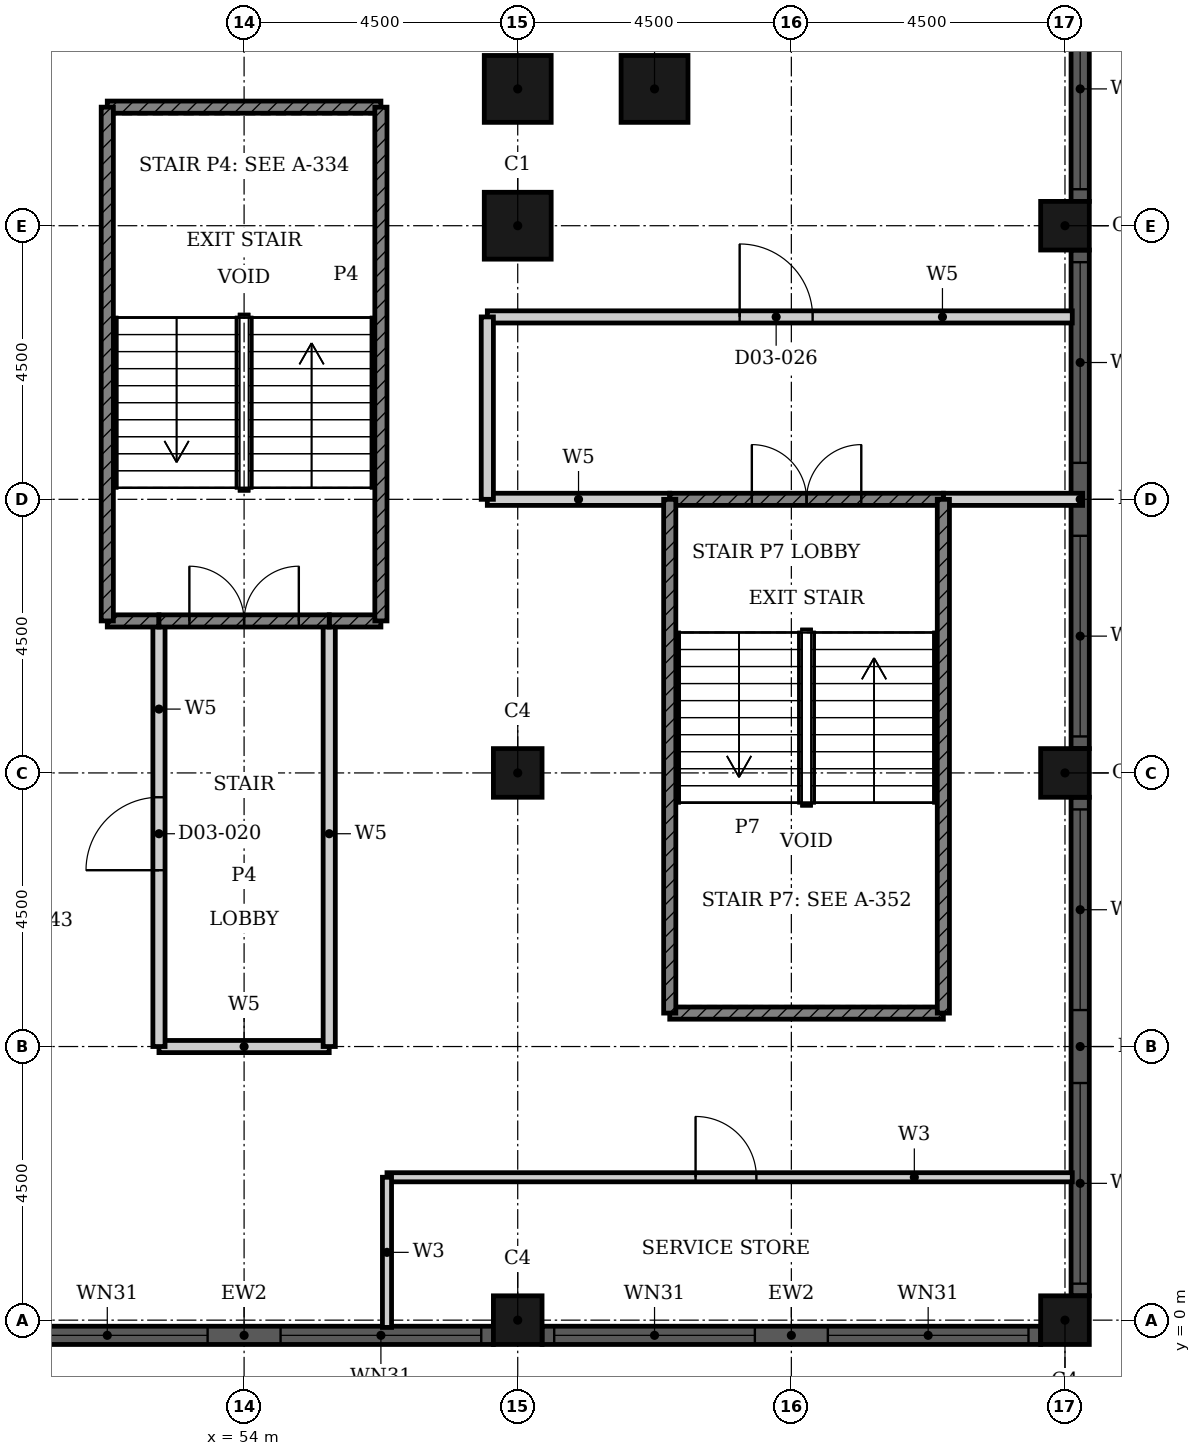
"""IFC4 building model, lengths in metres.
Left out: names, types, materials, properties, quantities, classifications, styles, units other than length and angle.
Written with IfcOpenShell. Run it as: python <this file> out.ifc"""

import sys

from ifc_helpers import new_model, si_unit, direction, frame, frame_2d, origin, origin_2d, place, context, subcontext, project, spatial, rectangle, hollow_rectangle, extrude, element, fill, save


model = new_model("IFC4")
c1 = context("Model", 3, precision=1e-05, world=origin(), true_north=direction((0.0, 1.0)))
c2 = subcontext(c1, "Body", "Model", "MODEL_VIEW")
j1 = project(units=[si_unit("LENGTHUNIT", "METRE"), si_unit("PLANEANGLEUNIT", "RADIAN")], contexts=[c1])
p1 = place(None, origin())
s1 = spatial("IfcSite", under=j1, at=p1, CompositionType="ELEMENT")
p2 = place(p1, origin())
s2 = spatial("IfcBuilding", under=s1, at=p2, CompositionType="ELEMENT")
p3 = place(p2, frame((0.0, 0.0, 17.4)))
s3 = spatial("IfcBuildingStorey", under=s2, at=p3, CompositionType="ELEMENT", Elevation=17.4)
for number, where, z_axis, x_axis in (
    (1, (58.5, 18.0, 0.0), (0.0, 0.0, 1.0), (1.0, 0.0, 0.0)),
    (2, (58.5, 20.25, 0.0), (0.0, 0.0, 1.0), (1.0, 0.0, 0.0)),
    (3, (60.75, 20.25, 0.0), (0.0, 0.0, 1.0), (1.0, 0.0, 0.0)),
):
    element("IfcColumn", number, at=place(p3, frame(where, z_axis=z_axis, x_axis=x_axis)), inside=s3, PredefinedType="COLUMN", context=c2, shape_type="SweptSolid", body=[
        extrude(hollow_rectangle(XDim=1.1, YDim=1.1, WallThickness=0.036, at=origin_2d()), origin(), (0.0, 0.0, 1.0), 6.6),
    ])
for number, where, z_axis, x_axis in (
    (4, (58.5, 0.0, 0.0), (0.0, 0.0, 1.0), (1.0, 0.0, 0.0)),
    (5, (67.5, 0.0, 0.0), (0.0, 0.0, 1.0), (1.0, 0.0, 0.0)),
    (6, (67.5, 9.0, 0.0), (0.0, 0.0, 1.0), (1.0, 0.0, 0.0)),
    (7, (67.5, 18.0, 0.0), (0.0, 0.0, 1.0), (1.0, 0.0, 0.0)),
    (8, (58.5, 9.0, 0.0), (0.0, 0.0, 1.0), (1.0, 0.0, 0.0)),
):
    element("IfcColumn", number, at=place(p3, frame(where, z_axis=z_axis, x_axis=x_axis)), inside=s3, PredefinedType="COLUMN", context=c2, shape_type="SweptSolid", body=[
        extrude(hollow_rectangle(XDim=0.8, YDim=0.8, WallThickness=0.025, at=origin_2d()), origin(), (0.0, 0.0, 1.0), 6.6),
    ])
p4 = place(p3, frame((67.75, 0.4, 0.0), z_axis=(0.0, 0.0, 1.0), x_axis=(0.0, 1.0, 0.0)))
e9 = element("IfcWall", 9, at=p4, inside=s3, PredefinedType="SOLIDWALL", context=c2, shape_type="SweptSolid", body=[
    extrude(rectangle(XDim=8.2, YDim=0.3, at=frame_2d((4.1, 0.0))), origin(), (0.0, 0.0, 1.0), 6.6),
])
p5 = place(p4, frame((0.2, 0.0, 0.9)))
e10 = element("IfcOpeningElement", 10, at=p5, cuts=e9, PredefinedType="OPENING", context=c2, shape_type="SweptSolid", body=[
    extrude(rectangle(XDim=3.3, YDim=3.6, at=frame_2d((1.65, 1.8))), frame((0.0, 0.16, 0.0), z_axis=(0.0, -1.0, 0.0), x_axis=(1.0, 0.0, 0.0)), (0.0, 0.0, 1.0), 0.32),
])
p6 = place(p4, frame((4.7, 0.0, 0.9)))
e11 = element("IfcOpeningElement", 11, at=p6, cuts=e9, PredefinedType="OPENING", context=c2, shape_type="SweptSolid", body=[
    extrude(rectangle(XDim=3.3, YDim=3.6, at=frame_2d((1.65, 1.8))), frame((0.0, 0.16, 0.0), z_axis=(0.0, -1.0, 0.0), x_axis=(1.0, 0.0, 0.0)), (0.0, 0.0, 1.0), 0.32),
])
p7 = place(p3, frame((67.75, 9.4, 0.0), z_axis=(0.0, 0.0, 1.0), x_axis=(0.0, 1.0, 0.0)))
e12 = element("IfcWall", 12, at=p7, inside=s3, PredefinedType="SOLIDWALL", context=c2, shape_type="SweptSolid", body=[
    extrude(rectangle(XDim=8.2, YDim=0.3, at=frame_2d((4.1, 0.0))), origin(), (0.0, 0.0, 1.0), 6.6),
])
p8 = place(p7, frame((0.2, 0.0, 0.9)))
e13 = element("IfcOpeningElement", 13, at=p8, cuts=e12, PredefinedType="OPENING", context=c2, shape_type="SweptSolid", body=[
    extrude(rectangle(XDim=3.3, YDim=3.6, at=frame_2d((1.65, 1.8))), frame((0.0, 0.16, 0.0), z_axis=(0.0, -1.0, 0.0), x_axis=(1.0, 0.0, 0.0)), (0.0, 0.0, 1.0), 0.32),
])
p9 = place(p7, frame((4.7, 0.0, 0.9)))
e14 = element("IfcOpeningElement", 14, at=p9, cuts=e12, PredefinedType="OPENING", context=c2, shape_type="SweptSolid", body=[
    extrude(rectangle(XDim=3.3, YDim=3.6, at=frame_2d((1.65, 1.8))), frame((0.0, 0.16, 0.0), z_axis=(0.0, -1.0, 0.0), x_axis=(1.0, 0.0, 0.0)), (0.0, 0.0, 1.0), 0.32),
])
p10 = place(p3, frame((67.75, 18.4, 0.0), z_axis=(0.0, 0.0, 1.0), x_axis=(0.0, 1.0, 0.0)))
e15 = element("IfcWall", 15, at=p10, inside=s3, PredefinedType="SOLIDWALL", context=c2, shape_type="SweptSolid", body=[
    extrude(rectangle(XDim=8.2, YDim=0.3, at=frame_2d((4.1, 0.0))), origin(), (0.0, 0.0, 1.0), 6.6),
])
p11 = place(p10, frame((0.2, 0.0, 0.9)))
e16 = element("IfcOpeningElement", 16, at=p11, cuts=e15, PredefinedType="OPENING", context=c2, shape_type="SweptSolid", body=[
    extrude(rectangle(XDim=3.3, YDim=3.6, at=frame_2d((1.65, 1.8))), frame((0.0, 0.16, 0.0), z_axis=(0.0, -1.0, 0.0), x_axis=(1.0, 0.0, 0.0)), (0.0, 0.0, 1.0), 0.32),
])
p12 = place(p10, frame((4.7, 0.0, 0.9)))
e17 = element("IfcOpeningElement", 17, at=p12, cuts=e15, PredefinedType="OPENING", context=c2, shape_type="SweptSolid", body=[
    extrude(rectangle(XDim=3.3, YDim=3.6, at=frame_2d((1.65, 1.8))), frame((0.0, 0.16, 0.0), z_axis=(0.0, -1.0, 0.0), x_axis=(1.0, 0.0, 0.0)), (0.0, 0.0, 1.0), 0.32),
])
p13 = place(p3, frame((49.9, -0.25, 0.0), z_axis=(0.0, 0.0, 1.0), x_axis=(1.0, 0.0, 0.0)))
e18 = element("IfcWall", 18, at=p13, inside=s3, PredefinedType="SOLIDWALL", context=c2, shape_type="SweptSolid", body=[
    extrude(rectangle(XDim=8.2, YDim=0.3, at=frame_2d((4.1, 0.0))), origin(), (0.0, 0.0, 1.0), 6.6),
])
p14 = place(p13, frame((0.2, 0.0, 0.9)))
e19 = element("IfcOpeningElement", 19, at=p14, cuts=e18, PredefinedType="OPENING", context=c2, shape_type="SweptSolid", body=[
    extrude(rectangle(XDim=3.3, YDim=3.6, at=frame_2d((1.65, 1.8))), frame((0.0, 0.16, 0.0), z_axis=(0.0, -1.0, 0.0), x_axis=(1.0, 0.0, 0.0)), (0.0, 0.0, 1.0), 0.32),
])
p15 = place(p13, frame((4.7, 0.0, 0.9)))
e20 = element("IfcOpeningElement", 20, at=p15, cuts=e18, PredefinedType="OPENING", context=c2, shape_type="SweptSolid", body=[
    extrude(rectangle(XDim=3.3, YDim=3.6, at=frame_2d((1.65, 1.8))), frame((0.0, 0.16, 0.0), z_axis=(0.0, -1.0, 0.0), x_axis=(1.0, 0.0, 0.0)), (0.0, 0.0, 1.0), 0.32),
])
p16 = place(p3, frame((58.9, -0.25, 0.0), z_axis=(0.0, 0.0, 1.0), x_axis=(1.0, 0.0, 0.0)))
e21 = element("IfcWall", 21, at=p16, inside=s3, PredefinedType="SOLIDWALL", context=c2, shape_type="SweptSolid", body=[
    extrude(rectangle(XDim=8.2, YDim=0.3, at=frame_2d((4.1, 0.0))), origin(), (0.0, 0.0, 1.0), 6.6),
])
p17 = place(p16, frame((0.2, 0.0, 0.9)))
e22 = element("IfcOpeningElement", 22, at=p17, cuts=e21, PredefinedType="OPENING", context=c2, shape_type="SweptSolid", body=[
    extrude(rectangle(XDim=3.3, YDim=3.6, at=frame_2d((1.65, 1.8))), frame((0.0, 0.16, 0.0), z_axis=(0.0, -1.0, 0.0), x_axis=(1.0, 0.0, 0.0)), (0.0, 0.0, 1.0), 0.32),
])
p18 = place(p16, frame((4.7, 0.0, 0.9)))
e23 = element("IfcOpeningElement", 23, at=p18, cuts=e21, PredefinedType="OPENING", context=c2, shape_type="SweptSolid", body=[
    extrude(rectangle(XDim=3.3, YDim=3.6, at=frame_2d((1.65, 1.8))), frame((0.0, 0.16, 0.0), z_axis=(0.0, -1.0, 0.0), x_axis=(1.0, 0.0, 0.0)), (0.0, 0.0, 1.0), 0.32),
])
p19 = place(p3, frame((56.35, 2.35, 0.0), z_axis=(0.0, 0.0, 1.0), x_axis=(1.0, 0.0, 0.0)))
e24 = element("IfcWall", 24, at=p19, inside=s3, PredefinedType="PARTITIONING", context=c2, shape_type="SweptSolid", body=[
    extrude(rectangle(XDim=11.27, YDim=0.15, at=frame_2d((5.635, 0.0))), origin(), (0.0, 0.0, 1.0), 6.25),
])
p20 = place(p19, frame((5.075, 0.0, 0.0)))
e25 = element("IfcOpeningElement", 25, at=p20, cuts=e24, PredefinedType="OPENING", context=c2, shape_type="SweptSolid", body=[
    extrude(rectangle(XDim=1.0, YDim=2.1, at=frame_2d((0.5, 1.05))), frame((0.0, 0.085, 0.0), z_axis=(0.0, -1.0, 0.0), x_axis=(1.0, 0.0, 0.0)), (0.0, 0.0, 1.0), 0.17),
])
p21 = place(p3, frame((56.35, -0.12, 0.0), z_axis=(0.0, 0.0, 1.0), x_axis=(0.0, 1.0, 0.0)))
e26 = element("IfcWall", 26, at=p21, inside=s3, PredefinedType="PARTITIONING", context=c2, shape_type="SweptSolid", body=[
    extrude(rectangle(XDim=2.47, YDim=0.15, at=frame_2d((1.235, 0.0))), origin(), (0.0, 0.0, 1.0), 6.25),
])
p22 = place(p3, frame((58.0, 13.5, 0.0), z_axis=(0.0, 0.0, 1.0), x_axis=(1.0, 0.0, 0.0)))
e27 = element("IfcWall", 27, at=p22, inside=s3, PredefinedType="PARTITIONING", context=c2, shape_type="SweptSolid", body=[
    extrude(rectangle(XDim=3.0, YDim=0.2, at=frame_2d((1.5, 0.0))), origin(), (0.0, 0.0, 1.0), 6.25),
])
p23 = place(p3, frame((65.5, 13.5, 0.0), z_axis=(0.0, 0.0, 1.0), x_axis=(1.0, 0.0, 0.0)))
e28 = element("IfcWall", 28, at=p23, inside=s3, PredefinedType="PARTITIONING", context=c2, shape_type="SweptSolid", body=[
    extrude(rectangle(XDim=2.29, YDim=0.2, at=frame_2d((1.145, 0.0))), origin(), (0.0, 0.0, 1.0), 6.25),
])
p24 = place(p3, frame((58.0, 16.5, 0.0), z_axis=(0.0, 0.0, 1.0), x_axis=(1.0, 0.0, 0.0)))
e29 = element("IfcWall", 29, at=p24, inside=s3, PredefinedType="PARTITIONING", context=c2, shape_type="SweptSolid", body=[
    extrude(rectangle(XDim=9.62, YDim=0.2, at=frame_2d((4.81, 0.0))), origin(), (0.0, 0.0, 1.0), 6.25),
])
p25 = place(p24, frame((4.15, 0.0, 0.0)))
e30 = element("IfcOpeningElement", 30, at=p25, cuts=e29, PredefinedType="OPENING", context=c2, shape_type="SweptSolid", body=[
    extrude(rectangle(XDim=1.2, YDim=2.1, at=frame_2d((0.6, 1.05))), frame((0.0, 0.11, 0.0), z_axis=(0.0, -1.0, 0.0), x_axis=(1.0, 0.0, 0.0)), (0.0, 0.0, 1.0), 0.22),
])
p26 = place(p3, frame((52.6, 4.5, 0.0), z_axis=(0.0, 0.0, 1.0), x_axis=(1.0, 0.0, 0.0)))
e31 = element("IfcWall", 31, at=p26, inside=s3, PredefinedType="PARTITIONING", context=c2, shape_type="SweptSolid", body=[
    extrude(rectangle(XDim=2.8, YDim=0.2, at=frame_2d((1.4, 0.0))), origin(), (0.0, 0.0, 1.0), 6.25),
])
p27 = place(p3, frame((52.6, 4.5, 0.0), z_axis=(0.0, 0.0, 1.0), x_axis=(0.0, 1.0, 0.0)))
e32 = element("IfcWall", 32, at=p27, inside=s3, PredefinedType="PARTITIONING", context=c2, shape_type="SweptSolid", body=[
    extrude(rectangle(XDim=7.0, YDim=0.2, at=frame_2d((3.5, 0.0))), origin(), (0.0, 0.0, 1.0), 6.25),
])
p28 = place(p27, frame((2.9, 0.0, 0.0)))
e33 = element("IfcOpeningElement", 33, at=p28, cuts=e32, PredefinedType="OPENING", context=c2, shape_type="SweptSolid", body=[
    extrude(rectangle(XDim=1.2, YDim=2.1, at=frame_2d((0.6, 1.05))), frame((0.0, 0.11, 0.0), z_axis=(0.0, -1.0, 0.0), x_axis=(1.0, 0.0, 0.0)), (0.0, 0.0, 1.0), 0.22),
])
p29 = place(p3, frame((55.4, 4.5, 0.0), z_axis=(0.0, 0.0, 1.0), x_axis=(0.0, 1.0, 0.0)))
e34 = element("IfcWall", 34, at=p29, inside=s3, PredefinedType="PARTITIONING", context=c2, shape_type="SweptSolid", body=[
    extrude(rectangle(XDim=7.0, YDim=0.2, at=frame_2d((3.5, 0.0))), origin(), (0.0, 0.0, 1.0), 6.25),
])
p30 = place(p3, frame((58.0, 13.5, 0.0), z_axis=(0.0, 0.0, 1.0), x_axis=(0.0, 1.0, 0.0)))
e35 = element("IfcWall", 35, at=p30, inside=s3, PredefinedType="PARTITIONING", context=c2, shape_type="SweptSolid", body=[
    extrude(rectangle(XDim=3.0, YDim=0.2, at=frame_2d((1.5, 0.0))), origin(), (0.0, 0.0, 1.0), 6.25),
])
for number, where, z_axis, x_axis in (
    (36, (51.75, 11.5, 0.0), (0.0, 0.0, 1.0), (1.0, 0.0, 0.0)),
    (37, (55.4, 11.5, 0.0), (0.0, 0.0, 1.0), (1.0, 0.0, 0.0)),
):
    element("IfcWall", number, at=place(p3, frame(where, z_axis=z_axis, x_axis=x_axis)), inside=s3, PredefinedType="SHEAR", context=c2, shape_type="SweptSolid", body=[
        extrude(rectangle(XDim=0.85, YDim=0.2, at=frame_2d((0.425, 0.0))), origin(), (0.0, 0.0, 1.0), 6.25),
    ])
p31 = place(p3, frame((52.6, 11.5, 0.0), z_axis=(0.0, 0.0, 1.0), x_axis=(1.0, 0.0, 0.0)))
e38 = element("IfcWall", 38, at=p31, inside=s3, PredefinedType="SHEAR", context=c2, shape_type="SweptSolid", body=[
    extrude(rectangle(XDim=2.8, YDim=0.2, at=frame_2d((1.4, 0.0))), origin(), (0.0, 0.0, 1.0), 6.25),
])
p32 = place(p31, frame((0.5, 0.0, 0.0)))
e39 = element("IfcOpeningElement", 39, at=p32, cuts=e38, PredefinedType="OPENING", context=c2, shape_type="SweptSolid", body=[
    extrude(rectangle(XDim=1.8, YDim=2.1, at=frame_2d((0.9, 1.05))), frame((0.0, 0.11, 0.0), z_axis=(0.0, -1.0, 0.0), x_axis=(1.0, 0.0, 0.0)), (0.0, 0.0, 1.0), 0.22),
])
p33 = place(p3, frame((61.0, 13.5, 0.0), z_axis=(0.0, 0.0, 1.0), x_axis=(1.0, 0.0, 0.0)))
e40 = element("IfcWall", 40, at=p33, inside=s3, PredefinedType="SHEAR", context=c2, shape_type="SweptSolid", body=[
    extrude(rectangle(XDim=4.5, YDim=0.2, at=frame_2d((2.25, 0.0))), origin(), (0.0, 0.0, 1.0), 6.25),
])
p34 = place(p33, frame((1.35, 0.0, 0.0)))
e41 = element("IfcOpeningElement", 41, at=p34, cuts=e40, PredefinedType="OPENING", context=c2, shape_type="SweptSolid", body=[
    extrude(rectangle(XDim=1.8, YDim=2.1, at=frame_2d((0.9, 1.05))), frame((0.0, 0.11, 0.0), z_axis=(0.0, -1.0, 0.0), x_axis=(1.0, 0.0, 0.0)), (0.0, 0.0, 1.0), 0.22),
])
for number, where, z_axis, x_axis in (
    (42, (51.75, 19.95, 0.0), (0.0, 0.0, 1.0), (1.0, 0.0, 0.0)),
    (43, (61.0, 5.05, 0.0), (0.0, 0.0, 1.0), (1.0, 0.0, 0.0)),
):
    element("IfcWall", number, at=place(p3, frame(where, z_axis=z_axis, x_axis=x_axis)), inside=s3, PredefinedType="SHEAR", context=c2, shape_type="SweptSolid", body=[
        extrude(rectangle(XDim=4.5, YDim=0.2, at=frame_2d((2.25, 0.0))), origin(), (0.0, 0.0, 1.0), 6.25),
    ])
for number, where, z_axis, x_axis in (
    (44, (51.75, 11.5, 0.0), (0.0, 0.0, 1.0), (0.0, 1.0, 0.0)),
    (45, (56.25, 11.5, 0.0), (0.0, 0.0, 1.0), (0.0, 1.0, 0.0)),
    (46, (61.0, 5.05, 0.0), (0.0, 0.0, 1.0), (0.0, 1.0, 0.0)),
    (47, (65.5, 5.05, 0.0), (0.0, 0.0, 1.0), (0.0, 1.0, 0.0)),
):
    element("IfcWall", number, at=place(p3, frame(where, z_axis=z_axis, x_axis=x_axis)), inside=s3, PredefinedType="SHEAR", context=c2, shape_type="SweptSolid", body=[
        extrude(rectangle(XDim=8.45, YDim=0.2, at=frame_2d((4.225, 0.0))), origin(), (0.0, 0.0, 1.0), 6.25),
    ])
p35 = place(p5, origin())
e48 = element("IfcWindow", 48, at=p35, inside=s3, PartitioningType="SINGLE_PANEL", PredefinedType="WINDOW", context=c2, shape_type="SweptSolid", body=[
    extrude(rectangle(XDim=3.3, YDim=3.6, at=frame_2d((1.65, 1.8))), frame((0.0, 0.03, 0.0), z_axis=(0.0, -1.0, 0.0), x_axis=(1.0, 0.0, 0.0)), (0.0, 0.0, 1.0), 0.06),
])
fill(e10, e48)
p36 = place(p6, origin())
e49 = element("IfcWindow", 49, at=p36, inside=s3, PartitioningType="SINGLE_PANEL", PredefinedType="WINDOW", context=c2, shape_type="SweptSolid", body=[
    extrude(rectangle(XDim=3.3, YDim=3.6, at=frame_2d((1.65, 1.8))), frame((0.0, 0.03, 0.0), z_axis=(0.0, -1.0, 0.0), x_axis=(1.0, 0.0, 0.0)), (0.0, 0.0, 1.0), 0.06),
])
fill(e11, e49)
p37 = place(p8, origin())
e50 = element("IfcWindow", 50, at=p37, inside=s3, PartitioningType="SINGLE_PANEL", PredefinedType="WINDOW", context=c2, shape_type="SweptSolid", body=[
    extrude(rectangle(XDim=3.3, YDim=3.6, at=frame_2d((1.65, 1.8))), frame((0.0, 0.03, 0.0), z_axis=(0.0, -1.0, 0.0), x_axis=(1.0, 0.0, 0.0)), (0.0, 0.0, 1.0), 0.06),
])
fill(e13, e50)
p38 = place(p9, origin())
e51 = element("IfcWindow", 51, at=p38, inside=s3, PartitioningType="SINGLE_PANEL", PredefinedType="WINDOW", context=c2, shape_type="SweptSolid", body=[
    extrude(rectangle(XDim=3.3, YDim=3.6, at=frame_2d((1.65, 1.8))), frame((0.0, 0.03, 0.0), z_axis=(0.0, -1.0, 0.0), x_axis=(1.0, 0.0, 0.0)), (0.0, 0.0, 1.0), 0.06),
])
fill(e14, e51)
p39 = place(p11, origin())
e52 = element("IfcWindow", 52, at=p39, inside=s3, PartitioningType="SINGLE_PANEL", PredefinedType="WINDOW", context=c2, shape_type="SweptSolid", body=[
    extrude(rectangle(XDim=3.3, YDim=3.6, at=frame_2d((1.65, 1.8))), frame((0.0, 0.03, 0.0), z_axis=(0.0, -1.0, 0.0), x_axis=(1.0, 0.0, 0.0)), (0.0, 0.0, 1.0), 0.06),
])
fill(e16, e52)
p40 = place(p14, origin())
e53 = element("IfcWindow", 53, at=p40, inside=s3, PartitioningType="SINGLE_PANEL", PredefinedType="WINDOW", context=c2, shape_type="SweptSolid", body=[
    extrude(rectangle(XDim=3.3, YDim=3.6, at=frame_2d((1.65, 1.8))), frame((0.0, 0.03, 0.0), z_axis=(0.0, -1.0, 0.0), x_axis=(1.0, 0.0, 0.0)), (0.0, 0.0, 1.0), 0.06),
])
fill(e19, e53)
p41 = place(p15, origin())
e54 = element("IfcWindow", 54, at=p41, inside=s3, PartitioningType="SINGLE_PANEL", PredefinedType="WINDOW", context=c2, shape_type="SweptSolid", body=[
    extrude(rectangle(XDim=3.3, YDim=3.6, at=frame_2d((1.65, 1.8))), frame((0.0, 0.03, 0.0), z_axis=(0.0, -1.0, 0.0), x_axis=(1.0, 0.0, 0.0)), (0.0, 0.0, 1.0), 0.06),
])
fill(e20, e54)
p42 = place(p17, origin())
e55 = element("IfcWindow", 55, at=p42, inside=s3, PartitioningType="SINGLE_PANEL", PredefinedType="WINDOW", context=c2, shape_type="SweptSolid", body=[
    extrude(rectangle(XDim=3.3, YDim=3.6, at=frame_2d((1.65, 1.8))), frame((0.0, 0.03, 0.0), z_axis=(0.0, -1.0, 0.0), x_axis=(1.0, 0.0, 0.0)), (0.0, 0.0, 1.0), 0.06),
])
fill(e22, e55)
p43 = place(p18, origin())
e56 = element("IfcWindow", 56, at=p43, inside=s3, PartitioningType="SINGLE_PANEL", PredefinedType="WINDOW", context=c2, shape_type="SweptSolid", body=[
    extrude(rectangle(XDim=3.3, YDim=3.6, at=frame_2d((1.65, 1.8))), frame((0.0, 0.03, 0.0), z_axis=(0.0, -1.0, 0.0), x_axis=(1.0, 0.0, 0.0)), (0.0, 0.0, 1.0), 0.06),
])
fill(e23, e56)
p44 = place(p28, origin())
e57 = element("IfcDoor", 57, at=p44, inside=s3, OperationType="SINGLE_SWING_RIGHT", PredefinedType="DOOR", context=c2, shape_type="SweptSolid", body=[
    extrude(rectangle(XDim=1.2, YDim=2.1, at=frame_2d((0.6, 1.05))), frame((0.0, 0.025, 0.0), z_axis=(0.0, -1.0, 0.0), x_axis=(1.0, 0.0, 0.0)), (0.0, 0.0, 1.0), 0.05),
])
fill(e33, e57)
p45 = place(p32, origin())
e58 = element("IfcDoor", 58, at=p45, inside=s3, OperationType="DOUBLE_DOOR_SINGLE_SWING", PredefinedType="DOOR", context=c2, shape_type="SweptSolid", body=[
    extrude(rectangle(XDim=1.8, YDim=2.1, at=frame_2d((0.9, 1.05))), frame((0.0, 0.025, 0.0), z_axis=(0.0, -1.0, 0.0), x_axis=(1.0, 0.0, 0.0)), (0.0, 0.0, 1.0), 0.05),
])
fill(e39, e58)
p46 = place(p25, origin())
e59 = element("IfcDoor", 59, at=p46, inside=s3, OperationType="SINGLE_SWING_LEFT", PredefinedType="DOOR", context=c2, shape_type="SweptSolid", body=[
    extrude(rectangle(XDim=1.2, YDim=2.1, at=frame_2d((0.6, 1.05))), frame((0.0, 0.025, 0.0), z_axis=(0.0, -1.0, 0.0), x_axis=(1.0, 0.0, 0.0)), (0.0, 0.0, 1.0), 0.05),
])
fill(e30, e59)
p47 = place(p34, origin())
e60 = element("IfcDoor", 60, at=p47, inside=s3, OperationType="DOUBLE_DOOR_SINGLE_SWING", PredefinedType="DOOR", context=c2, shape_type="SweptSolid", body=[
    extrude(rectangle(XDim=1.8, YDim=2.1, at=frame_2d((0.9, 1.05))), frame((0.0, 0.025, 0.0), z_axis=(0.0, -1.0, 0.0), x_axis=(1.0, 0.0, 0.0)), (0.0, 0.0, 1.0), 0.05),
])
fill(e41, e60)
p48 = place(p20, origin())
e61 = element("IfcDoor", 61, at=p48, inside=s3, OperationType="SINGLE_SWING_LEFT", PredefinedType="DOOR", context=c2, shape_type="SweptSolid", body=[
    extrude(rectangle(XDim=1.0, YDim=2.1, at=frame_2d((0.5, 1.05))), frame((0.0, 0.025, 0.0), z_axis=(0.0, -1.0, 0.0), x_axis=(1.0, 0.0, 0.0)), (0.0, 0.0, 1.0), 0.05),
])
fill(e25, e61)
save(model, sys.argv[1])
